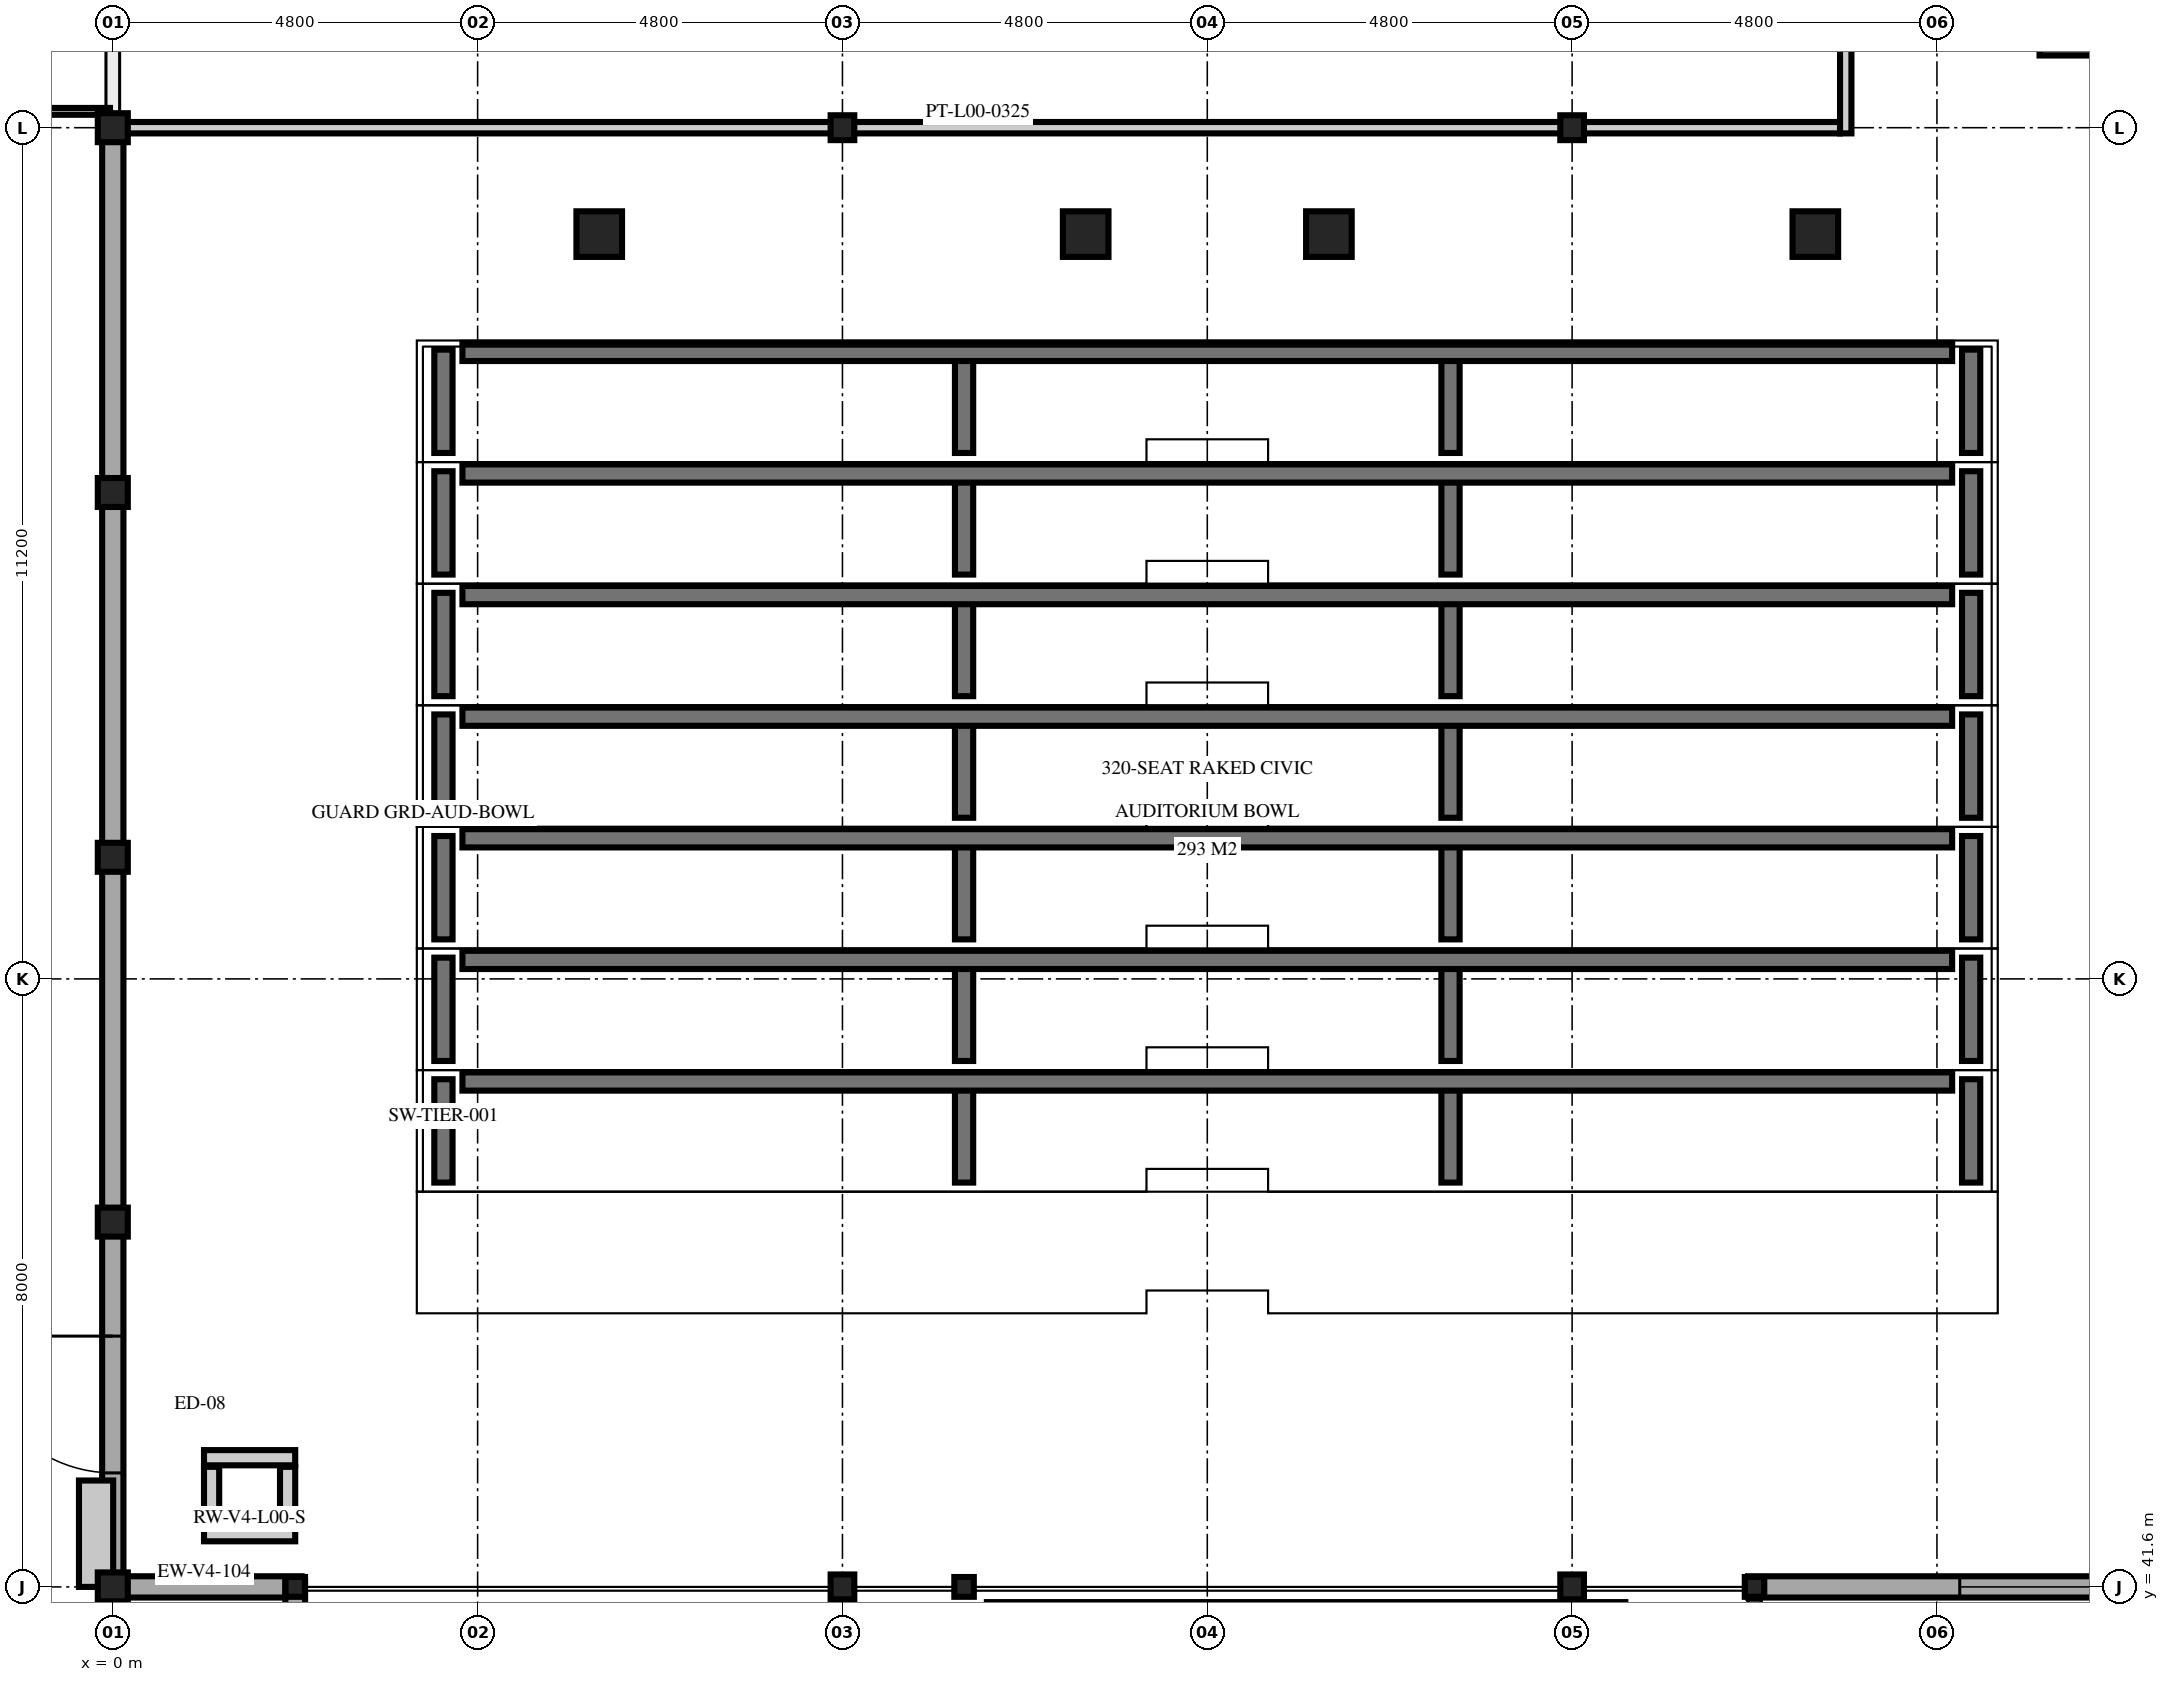
"""IFC4 building model, lengths in metres.
Left out: names, types, materials, properties, quantities, classifications, styles, units other than length and angle.
Written with IfcOpenShell. Run it as: python <this file> out.ifc"""

import sys

from ifc_helpers import new_model, si_unit, direction, frame, frame_2d, origin, origin_2d, place, context, subcontext, project, spatial, rectangle, i_section, extrude, element, fill, save


model = new_model("IFC4")
c1 = context("Model", 3, precision=1e-05, world=origin(), true_north=direction((0.0, 1.0)))
c2 = subcontext(c1, "Body", "Model", "MODEL_VIEW")
j1 = project(units=[si_unit("LENGTHUNIT", "METRE"), si_unit("PLANEANGLEUNIT", "RADIAN")], contexts=[c1])
p1 = place(None, origin())
s1 = spatial("IfcSite", under=j1, at=p1, CompositionType="ELEMENT")
p2 = place(p1, origin())
s2 = spatial("IfcBuilding", under=s1, at=p2, CompositionType="ELEMENT")
p3 = place(p2, origin())
s3 = spatial("IfcBuildingStorey", under=s2, at=p3, CompositionType="ELEMENT", Elevation=0.0)
for number, where, z_axis, x_axis in (
    (1, (0.0, 41.6, 0.0), (0.0, 0.0, 1.0), (1.0, 0.0, 0.0)),
    (2, (0.0, 46.4, 0.0), (0.0, 0.0, 1.0), (1.0, 0.0, 0.0)),
    (3, (0.0, 51.2, 0.0), (0.0, 0.0, 1.0), (1.0, 0.0, 0.0)),
    (4, (0.0, 56.0, 0.0), (0.0, 0.0, 1.0), (1.0, 0.0, 0.0)),
    (5, (0.0, 60.8, 0.0), (0.0, 0.0, 1.0), (1.0, 0.0, 0.0)),
):
    element("IfcColumn", number, at=place(p3, frame(where, z_axis=z_axis, x_axis=x_axis)), inside=s3, PredefinedType="COLUMN", context=c2, shape_type="SweptSolid", body=[
        extrude(i_section(OverallWidth=0.395, OverallDepth=0.381, WebThickness=0.018, FlangeThickness=0.03, at=origin_2d()), origin(), (0.0, 0.0, 1.0), 5.1),
    ])
for number, where, z_axis, x_axis in (
    (6, (9.6, 41.6, 0.0), (0.0, 0.0, 1.0), (1.0, 0.0, 0.0)),
    (7, (9.6, 60.8, 0.0), (0.0, 0.0, 1.0), (1.0, 0.0, 0.0)),
    (8, (19.2, 41.6, 0.0), (0.0, 0.0, 1.0), (1.0, 0.0, 0.0)),
    (9, (19.2, 60.8, 0.0), (0.0, 0.0, 1.0), (1.0, 0.0, 0.0)),
):
    element("IfcColumn", number, at=place(p3, frame(where, z_axis=z_axis, x_axis=x_axis)), inside=s3, PredefinedType="COLUMN", context=c2, shape_type="SweptSolid", body=[
        extrude(i_section(OverallWidth=0.311, OverallDepth=0.327, WebThickness=0.016, FlangeThickness=0.025, at=origin_2d()), origin(), (0.0, 0.0, 1.0), 5.1),
    ])
for number, where, z_axis, x_axis in (
    (10, (2.4, 41.6, 0.0), (0.0, 0.0, 1.0), (1.0, 0.0, 0.0)),
    (11, (11.2, 41.6, 0.0), (0.0, 0.0, 1.0), (1.0, 0.0, 0.0)),
    (12, (21.6, 41.6, 0.0), (0.0, 0.0, 1.0), (1.0, 0.0, 0.0)),
):
    element("IfcColumn", number, at=place(p3, frame(where, z_axis=z_axis, x_axis=x_axis)), inside=s3, PredefinedType="COLUMN", context=c2, shape_type="SweptSolid", body=[
        extrude(i_section(OverallWidth=0.256, OverallDepth=0.26, WebThickness=0.01, FlangeThickness=0.017, at=origin_2d()), origin(), (0.0, 0.0, 1.0), 5.1),
    ])
for number, where, z_axis, x_axis in (
    (13, (4.35, 46.92, 0.0), (0.0, 0.0, 1.0), (0.0, 1.0, 0.0)),
    (14, (11.2, 46.92, 0.0), (0.0, 0.0, 1.0), (0.0, 1.0, 0.0)),
    (15, (17.6, 46.92, 0.0), (0.0, 0.0, 1.0), (0.0, 1.0, 0.0)),
    (16, (24.45, 46.92, 0.0), (0.0, 0.0, 1.0), (0.0, 1.0, 0.0)),
):
    element("IfcWall", number, at=place(p3, frame(where, z_axis=z_axis, x_axis=x_axis)), inside=s3, PredefinedType="SHEAR", context=c2, shape_type="SweptSolid", body=[
        extrude(rectangle(XDim=1.36, YDim=0.24, at=frame_2d((0.68, 0.0))), origin(), (0.0, 0.0, 1.0), 0.49),
    ])
p4 = place(p3, frame((4.6, 48.25, 0.0), z_axis=(0.0, 0.0, 1.0), x_axis=(1.0, 0.0, 0.0)))
e17 = element("IfcWall", 17, at=p4, inside=s3, PredefinedType="SHEAR", context=c2, shape_type="SweptSolid", body=[
    extrude(rectangle(XDim=19.6, YDim=0.24, at=frame_2d((9.8, 0.0))), origin(), (0.0, 0.0, 1.0), 0.49),
])
for number, where, z_axis, x_axis in (
    (18, (4.35, 48.52, 0.0), (0.0, 0.0, 1.0), (0.0, 1.0, 0.0)),
    (19, (11.2, 48.52, 0.0), (0.0, 0.0, 1.0), (0.0, 1.0, 0.0)),
    (20, (17.6, 48.52, 0.0), (0.0, 0.0, 1.0), (0.0, 1.0, 0.0)),
    (21, (24.45, 48.52, 0.0), (0.0, 0.0, 1.0), (0.0, 1.0, 0.0)),
):
    element("IfcWall", number, at=place(p3, frame(where, z_axis=z_axis, x_axis=x_axis)), inside=s3, PredefinedType="SHEAR", context=c2, shape_type="SweptSolid", body=[
        extrude(rectangle(XDim=1.36, YDim=0.24, at=frame_2d((0.68, 0.0))), origin(), (0.0, 0.0, 1.0), 0.81),
    ])
p5 = place(p3, frame((4.6, 49.85, 0.0), z_axis=(0.0, 0.0, 1.0), x_axis=(1.0, 0.0, 0.0)))
e22 = element("IfcWall", 22, at=p5, inside=s3, PredefinedType="SHEAR", context=c2, shape_type="SweptSolid", body=[
    extrude(rectangle(XDim=19.6, YDim=0.24, at=frame_2d((9.8, 0.0))), origin(), (0.0, 0.0, 1.0), 0.81),
])
for number, where, z_axis, x_axis in (
    (23, (4.35, 50.12, 0.0), (0.0, 0.0, 1.0), (0.0, 1.0, 0.0)),
    (24, (11.2, 50.12, 0.0), (0.0, 0.0, 1.0), (0.0, 1.0, 0.0)),
    (25, (17.6, 50.12, 0.0), (0.0, 0.0, 1.0), (0.0, 1.0, 0.0)),
    (26, (24.45, 50.12, 0.0), (0.0, 0.0, 1.0), (0.0, 1.0, 0.0)),
):
    element("IfcWall", number, at=place(p3, frame(where, z_axis=z_axis, x_axis=x_axis)), inside=s3, PredefinedType="SHEAR", context=c2, shape_type="SweptSolid", body=[
        extrude(rectangle(XDim=1.36, YDim=0.24, at=frame_2d((0.68, 0.0))), origin(), (0.0, 0.0, 1.0), 1.13),
    ])
p6 = place(p3, frame((4.6, 51.45, 0.0), z_axis=(0.0, 0.0, 1.0), x_axis=(1.0, 0.0, 0.0)))
e27 = element("IfcWall", 27, at=p6, inside=s3, PredefinedType="SHEAR", context=c2, shape_type="SweptSolid", body=[
    extrude(rectangle(XDim=19.6, YDim=0.24, at=frame_2d((9.8, 0.0))), origin(), (0.0, 0.0, 1.0), 1.13),
])
for number, where, z_axis, x_axis in (
    (28, (4.35, 51.72, 0.0), (0.0, 0.0, 1.0), (0.0, 1.0, 0.0)),
    (29, (11.2, 51.72, 0.0), (0.0, 0.0, 1.0), (0.0, 1.0, 0.0)),
    (30, (17.6, 51.72, 0.0), (0.0, 0.0, 1.0), (0.0, 1.0, 0.0)),
    (31, (24.45, 51.72, 0.0), (0.0, 0.0, 1.0), (0.0, 1.0, 0.0)),
):
    element("IfcWall", number, at=place(p3, frame(where, z_axis=z_axis, x_axis=x_axis)), inside=s3, PredefinedType="SHEAR", context=c2, shape_type="SweptSolid", body=[
        extrude(rectangle(XDim=1.36, YDim=0.24, at=frame_2d((0.68, 0.0))), origin(), (0.0, 0.0, 1.0), 1.45),
    ])
p7 = place(p3, frame((4.6, 53.05, 0.0), z_axis=(0.0, 0.0, 1.0), x_axis=(1.0, 0.0, 0.0)))
e32 = element("IfcWall", 32, at=p7, inside=s3, PredefinedType="SHEAR", context=c2, shape_type="SweptSolid", body=[
    extrude(rectangle(XDim=19.6, YDim=0.24, at=frame_2d((9.8, 0.0))), origin(), (0.0, 0.0, 1.0), 1.45),
])
for number, where, z_axis, x_axis in (
    (33, (4.35, 53.32, 0.0), (0.0, 0.0, 1.0), (0.0, 1.0, 0.0)),
    (34, (11.2, 53.32, 0.0), (0.0, 0.0, 1.0), (0.0, 1.0, 0.0)),
    (35, (17.6, 53.32, 0.0), (0.0, 0.0, 1.0), (0.0, 1.0, 0.0)),
    (36, (24.45, 53.32, 0.0), (0.0, 0.0, 1.0), (0.0, 1.0, 0.0)),
):
    element("IfcWall", number, at=place(p3, frame(where, z_axis=z_axis, x_axis=x_axis)), inside=s3, PredefinedType="SHEAR", context=c2, shape_type="SweptSolid", body=[
        extrude(rectangle(XDim=1.36, YDim=0.24, at=frame_2d((0.68, 0.0))), origin(), (0.0, 0.0, 1.0), 1.77),
    ])
p8 = place(p3, frame((4.6, 54.65, 0.0), z_axis=(0.0, 0.0, 1.0), x_axis=(1.0, 0.0, 0.0)))
e37 = element("IfcWall", 37, at=p8, inside=s3, PredefinedType="SHEAR", context=c2, shape_type="SweptSolid", body=[
    extrude(rectangle(XDim=19.6, YDim=0.24, at=frame_2d((9.8, 0.0))), origin(), (0.0, 0.0, 1.0), 1.77),
])
for number, where, z_axis, x_axis in (
    (38, (4.35, 54.92, 0.0), (0.0, 0.0, 1.0), (0.0, 1.0, 0.0)),
    (39, (11.2, 54.92, 0.0), (0.0, 0.0, 1.0), (0.0, 1.0, 0.0)),
    (40, (17.6, 54.92, 0.0), (0.0, 0.0, 1.0), (0.0, 1.0, 0.0)),
    (41, (24.45, 54.92, 0.0), (0.0, 0.0, 1.0), (0.0, 1.0, 0.0)),
):
    element("IfcWall", number, at=place(p3, frame(where, z_axis=z_axis, x_axis=x_axis)), inside=s3, PredefinedType="SHEAR", context=c2, shape_type="SweptSolid", body=[
        extrude(rectangle(XDim=1.36, YDim=0.24, at=frame_2d((0.68, 0.0))), origin(), (0.0, 0.0, 1.0), 2.09),
    ])
p9 = place(p3, frame((4.6, 56.25, 0.0), z_axis=(0.0, 0.0, 1.0), x_axis=(1.0, 0.0, 0.0)))
e42 = element("IfcWall", 42, at=p9, inside=s3, PredefinedType="SHEAR", context=c2, shape_type="SweptSolid", body=[
    extrude(rectangle(XDim=19.6, YDim=0.24, at=frame_2d((9.8, 0.0))), origin(), (0.0, 0.0, 1.0), 2.09),
])
for number, where, z_axis, x_axis in (
    (43, (4.35, 56.52, 0.0), (0.0, 0.0, 1.0), (0.0, 1.0, 0.0)),
    (44, (11.2, 56.52, 0.0), (0.0, 0.0, 1.0), (0.0, 1.0, 0.0)),
    (45, (17.6, 56.52, 0.0), (0.0, 0.0, 1.0), (0.0, 1.0, 0.0)),
    (46, (24.45, 56.52, 0.0), (0.0, 0.0, 1.0), (0.0, 1.0, 0.0)),
):
    element("IfcWall", number, at=place(p3, frame(where, z_axis=z_axis, x_axis=x_axis)), inside=s3, PredefinedType="SHEAR", context=c2, shape_type="SweptSolid", body=[
        extrude(rectangle(XDim=1.36, YDim=0.24, at=frame_2d((0.68, 0.0))), origin(), (0.0, 0.0, 1.0), 2.41),
    ])
p10 = place(p3, frame((4.6, 57.85, 0.0), z_axis=(0.0, 0.0, 1.0), x_axis=(1.0, 0.0, 0.0)))
e47 = element("IfcWall", 47, at=p10, inside=s3, PredefinedType="SHEAR", context=c2, shape_type="SweptSolid", body=[
    extrude(rectangle(XDim=19.6, YDim=0.24, at=frame_2d((9.8, 0.0))), origin(), (0.0, 0.0, 1.0), 2.41),
])
for number, where, z_axis, x_axis in (
    (48, (6.4, 59.4, 0.0), (0.0, 0.0, 1.0), (1.0, 0.0, 0.0)),
    (49, (12.8, 59.4, 0.0), (0.0, 0.0, 1.0), (1.0, 0.0, 0.0)),
    (50, (16.0, 59.4, 0.0), (0.0, 0.0, 1.0), (1.0, 0.0, 0.0)),
    (51, (22.4, 59.4, 0.0), (0.0, 0.0, 1.0), (1.0, 0.0, 0.0)),
):
    element("IfcColumn", number, at=place(p3, frame(where, z_axis=z_axis, x_axis=x_axis)), inside=s3, PredefinedType="COLUMN", context=c2, shape_type="SweptSolid", body=[
        extrude(rectangle(XDim=0.6, YDim=0.6, at=origin_2d()), origin(), (0.0, 0.0, 1.0), 2.48),
    ])
p11 = place(p3, frame((11.5, 41.25, 0.0), z_axis=(0.0, 0.0, 1.0), x_axis=(1.0, 0.0, 0.0)))
e52 = element("IfcWall", 52, at=p11, inside=s3, PredefinedType="SHEAR", context=c2, shape_type="SweptSolid", body=[
    extrude(rectangle(XDim=8.4, YDim=0.3, at=frame_2d((4.2, 0.0))), origin(), (0.0, 0.0, 1.0), 4.88),
])
p12 = place(p3, frame((28.05, 61.875, 0.0), z_axis=(0.0, 0.0, 1.0), x_axis=(-1.0, 0.0, 0.0)))
e53 = element("IfcWall", 53, at=p12, inside=s3, PredefinedType="SHEAR", context=c2, shape_type="SweptSolid", body=[
    extrude(rectangle(XDim=2.7, YDim=0.25, at=frame_2d((1.35, 0.0))), origin(), (0.0, 0.0, 1.0), 4.88),
])
for number, where, z_axis, x_axis in (
    (54, (2.4, 42.3, 0.0), (0.0, 0.0, 1.0), (-1.0, 0.0, 0.0)),
    (55, (1.2, 43.3, 0.0), (0.0, 0.0, 1.0), (1.0, 0.0, 0.0)),
):
    element("IfcWall", number, at=place(p3, frame(where, z_axis=z_axis, x_axis=x_axis)), inside=s3, PredefinedType="PARTITIONING", context=c2, shape_type="SweptSolid", body=[
        extrude(rectangle(XDim=1.2, YDim=0.2, at=frame_2d((0.6, 0.0))), origin(), (0.0, 0.0, 1.0), 4.38),
    ])
for number, where, z_axis, x_axis in (
    (56, (1.3, 42.42, 0.0), (0.0, 0.0, 1.0), (0.0, 1.0, 0.0)),
    (57, (2.3, 43.18, 0.0), (0.0, 0.0, 1.0), (0.0, -1.0, 0.0)),
):
    element("IfcWall", number, at=place(p3, frame(where, z_axis=z_axis, x_axis=x_axis)), inside=s3, PredefinedType="PARTITIONING", context=c2, shape_type="SweptSolid", body=[
        extrude(rectangle(XDim=0.76, YDim=0.2, at=frame_2d((0.38, 0.0))), origin(), (0.0, 0.0, 1.0), 4.38),
    ])
p13 = place(p3, frame((2.485, 41.6, 0.0), z_axis=(0.0, 0.0, 1.0), x_axis=(-1.0, 0.0, 0.0)))
e58 = element("IfcWall", 58, at=p13, inside=s3, PredefinedType="SOLIDWALL", context=c2, shape_type="SweptSolid", body=[
    extrude(rectangle(XDim=2.57, YDim=0.28, at=frame_2d((1.285, 0.0))), origin(), (0.0, 0.0, 1.0), 4.322),
])
p14 = place(p3, frame((28.885, 41.6, 0.0), z_axis=(0.0, 0.0, 1.0), x_axis=(-1.0, 0.0, 0.0)))
e59 = element("IfcWall", 59, at=p14, inside=s3, PredefinedType="SOLIDWALL", context=c2, shape_type="SweptSolid", body=[
    extrude(rectangle(XDim=7.37, YDim=0.28, at=frame_2d((3.685, 0.0))), origin(), (0.0, 0.0, 1.0), 4.322),
])
p15 = place(p14, frame((2.785, 0.0, 1.0)))
e60 = element("IfcOpeningElement", 60, at=p15, cuts=e59, PredefinedType="OPENING", context=c2, shape_type="SweptSolid", body=[
    extrude(rectangle(XDim=1.8, YDim=2.1, at=frame_2d((0.9, 1.05))), frame((0.0, 0.15, 0.0), z_axis=(0.0, -1.0, 0.0), x_axis=(1.0, 0.0, 0.0)), (0.0, 0.0, 1.0), 0.3),
])
p16 = place(p3, frame((0.0, 41.515, 0.0), z_axis=(0.0, 0.0, 1.0), x_axis=(0.0, 1.0, 0.0)))
e61 = element("IfcWall", 61, at=p16, inside=s3, PredefinedType="SOLIDWALL", context=c2, shape_type="SweptSolid", body=[
    extrude(rectangle(XDim=4.97, YDim=0.28, at=frame_2d((2.485, 0.0))), origin(), (0.0, 0.0, 1.0), 4.322),
])
p17 = place(p16, frame((1.585, 0.0, 0.0)))
e62 = element("IfcOpeningElement", 62, at=p17, cuts=e61, PredefinedType="OPENING", context=c2, shape_type="SweptSolid", body=[
    extrude(rectangle(XDim=1.8, YDim=2.4, at=frame_2d((0.9, 1.2))), frame((0.0, 0.15, 0.0), z_axis=(0.0, -1.0, 0.0), x_axis=(1.0, 0.0, 0.0)), (0.0, 0.0, 1.0), 0.3),
])
for number, where, z_axis, x_axis in (
    (63, (0.0, 46.315, 0.0), (0.0, 0.0, 1.0), (0.0, 1.0, 0.0)),
    (64, (0.0, 51.115, 0.0), (0.0, 0.0, 1.0), (0.0, 1.0, 0.0)),
    (65, (0.0, 55.915, 0.0), (0.0, 0.0, 1.0), (0.0, 1.0, 0.0)),
):
    element("IfcWall", number, at=place(p3, frame(where, z_axis=z_axis, x_axis=x_axis)), inside=s3, PredefinedType="SOLIDWALL", context=c2, shape_type="SweptSolid", body=[
        extrude(rectangle(XDim=4.97, YDim=0.28, at=frame_2d((2.485, 0.0))), origin(), (0.0, 0.0, 1.0), 4.322),
    ])
p18 = place(p3, frame((2.4, 36.715, 0.0), z_axis=(0.0, 0.0, 1.0), x_axis=(0.0, 1.0, 0.0)))
e66 = element("IfcWall", 66, at=p18, inside=s3, PredefinedType="SOLIDWALL", context=c2, shape_type="SweptSolid", body=[
    extrude(rectangle(XDim=4.97, YDim=0.26, at=frame_2d((2.485, 0.0))), origin(), (0.0, 0.0, 1.0), 4.305),
])
p19 = place(p18, frame((1.585, 0.0, 0.0)))
e67 = element("IfcOpeningElement", 67, at=p19, cuts=e66, PredefinedType="OPENING", context=c2, shape_type="SweptSolid", body=[
    extrude(rectangle(XDim=1.8, YDim=2.4, at=frame_2d((0.9, 1.2))), frame((0.0, 0.14, 0.0), z_axis=(0.0, -1.0, 0.0), x_axis=(1.0, 0.0, 0.0)), (0.0, 0.0, 1.0), 0.28),
])
p20 = place(p3, frame((0.04, 60.8, 0.0), z_axis=(0.0, 0.0, 1.0), x_axis=(1.0, 0.0, 0.0)))
e68 = element("IfcWall", 68, at=p20, inside=s3, PredefinedType="PARTITIONING", context=c2, shape_type="SweptSolid", body=[
    extrude(rectangle(XDim=22.685, YDim=0.15, at=frame_2d((11.343, 0.0))), origin(), (0.0, 0.0, 1.0), 4.322),
])
p21 = place(p3, frame((22.8, 60.725, 0.0), z_axis=(0.0, 0.0, 1.0), x_axis=(0.0, 1.0, 0.0)))
e69 = element("IfcWall", 69, at=p21, inside=s3, PredefinedType="PARTITIONING", context=c2, shape_type="SweptSolid", body=[
    extrude(rectangle(XDim=9.75, YDim=0.15, at=frame_2d((4.875, 0.0))), origin(), (0.0, 0.0, 1.0), 4.355),
])
p22 = place(p21, frame((4.075, 0.0, 0.0)))
e70 = element("IfcOpeningElement", 70, at=p22, cuts=e69, PredefinedType="OPENING", context=c2, shape_type="SweptSolid", body=[
    extrude(rectangle(XDim=1.6, YDim=2.25, at=frame_2d((0.8, 1.125))), frame((0.0, 0.085, 0.0), z_axis=(0.0, -1.0, 0.0), x_axis=(1.0, 0.0, 0.0)), (0.0, 0.0, 1.0), 0.17),
])
p23 = place(p15, origin())
e71 = element("IfcWindow", 71, at=p23, inside=s3, PartitioningType="SINGLE_PANEL", PredefinedType="WINDOW", context=c2, shape_type="SweptSolid", body=[
    extrude(rectangle(XDim=1.8, YDim=2.1, at=frame_2d((0.9, 1.05))), frame((0.0, 0.03, 0.0), z_axis=(0.0, -1.0, 0.0), x_axis=(1.0, 0.0, 0.0)), (0.0, 0.0, 1.0), 0.06),
])
fill(e60, e71)
p24 = place(p17, origin())
e72 = element("IfcDoor", 72, at=p24, inside=s3, OperationType="SINGLE_SWING_RIGHT", PredefinedType="DOOR", context=c2, shape_type="SweptSolid", body=[
    extrude(rectangle(XDim=1.8, YDim=2.4, at=frame_2d((0.9, 1.2))), frame((0.0, 0.025, 0.0), z_axis=(0.0, -1.0, 0.0), x_axis=(1.0, 0.0, 0.0)), (0.0, 0.0, 1.0), 0.05),
])
fill(e62, e72)
save(model, sys.argv[1])
